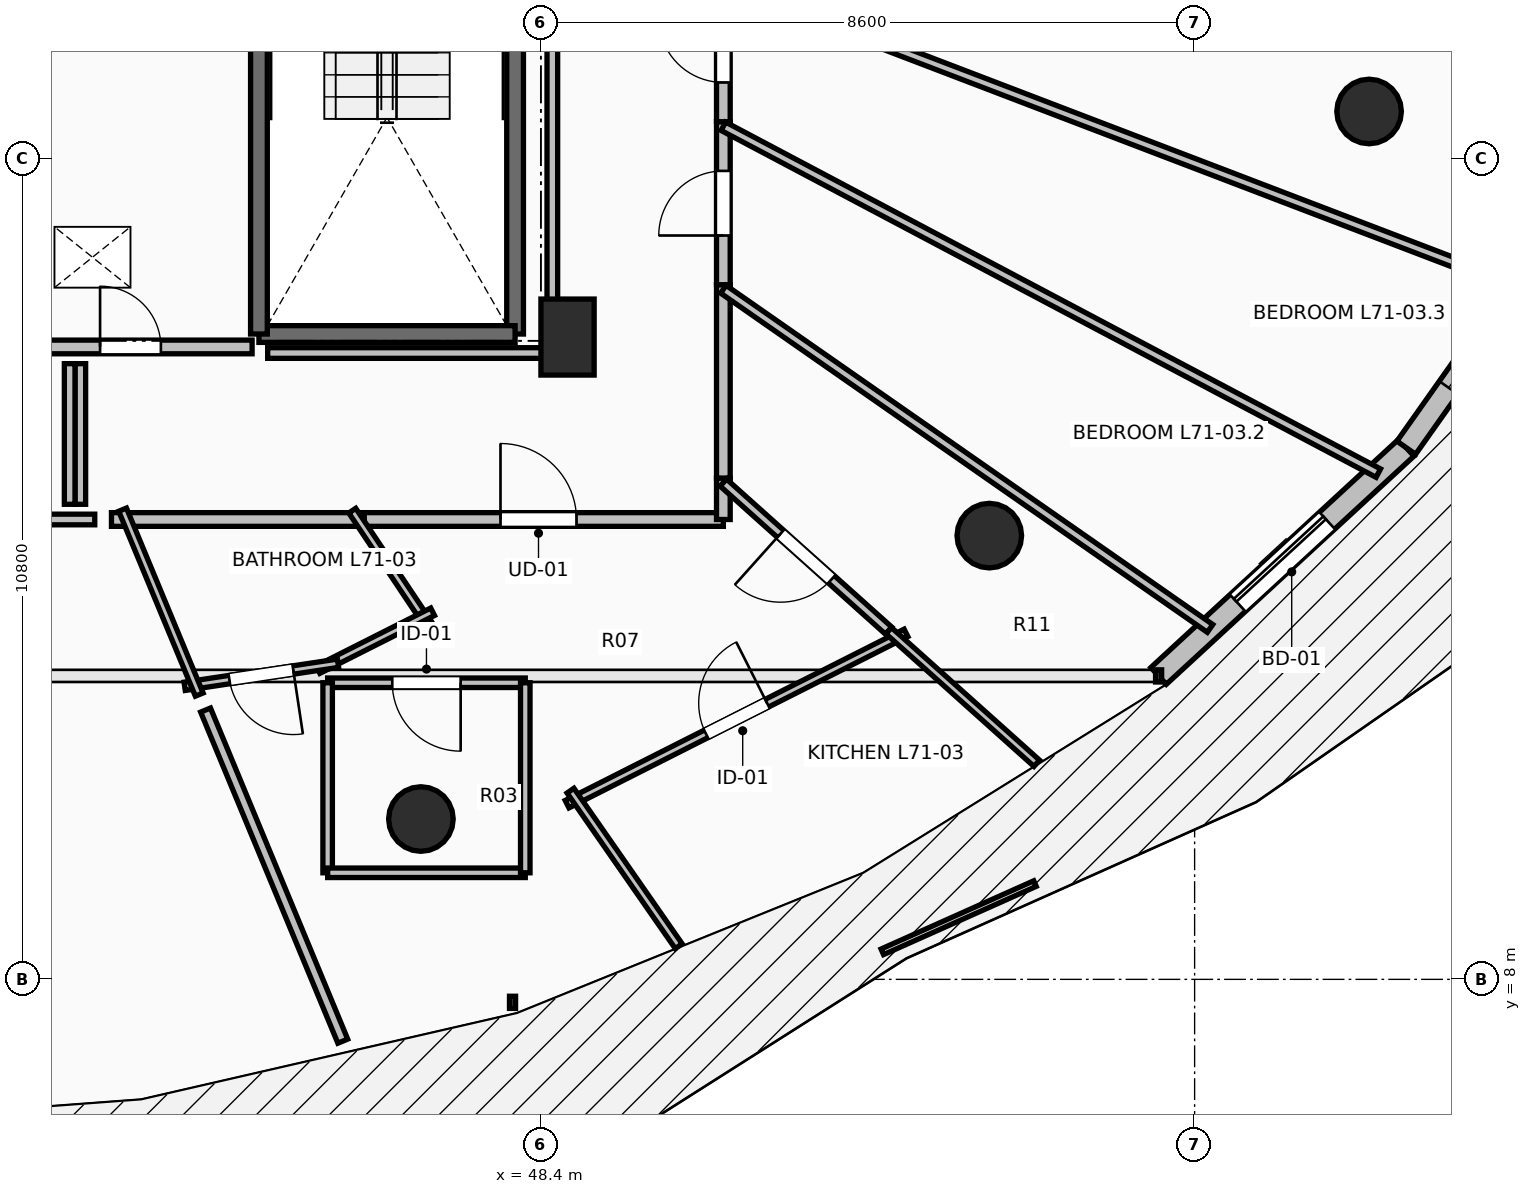
"""IFC4 building model, lengths in metres.
Left out: names, types, materials, properties, quantities, classifications, styles, units other than length and angle.
Written with IfcOpenShell. Run it as: python <this file> out.ifc"""

import sys

from ifc_helpers import new_model, si_unit, direction, frame, frame_2d, origin, origin_2d, place, context, subcontext, project, spatial, rectangle, circle, extrude, element, fill, save


model = new_model("IFC4")
c1 = context("Model", 3, precision=1e-05, world=origin(), true_north=direction((0.0, 1.0)))
c2 = subcontext(c1, "Body", "Model", "MODEL_VIEW")
j1 = project(units=[si_unit("LENGTHUNIT", "METRE"), si_unit("PLANEANGLEUNIT", "RADIAN")], contexts=[c1])
p1 = place(None, origin())
s1 = spatial("IfcSite", under=j1, at=p1, CompositionType="ELEMENT")
p2 = place(p1, origin())
s2 = spatial("IfcBuilding", under=s1, at=p2, CompositionType="ELEMENT")
p3 = place(p2, frame((0.0, 0.0, 262.65)))
s3 = spatial("IfcBuildingStorey", under=s2, at=p3, CompositionType="ELEMENT", Elevation=262.65)
for number, where, z_axis, x_axis in (
    (1, (46.821, 10.109, 0.0), (0.0, 0.0, 1.0), (0.383, -0.924, 0.0)),
    (2, (54.299, 13.838, 0.0), (0.0, 0.0, 1.0), (0.707, -0.707, 0.0)),
    (3, (59.295, 19.418, 0.0), (0.0, 0.0, 1.0), (0.924, -0.383, 0.0)),
):
    element("IfcColumn", number, at=place(p3, frame(where, z_axis=z_axis, x_axis=x_axis)), inside=s3, PredefinedType="COLUMN", context=c2, shape_type="SweptSolid", body=[
        extrude(circle(Radius=0.425, at=origin_2d()), origin(), (0.0, 0.0, 1.0), 3.55),
    ])
p4 = place(p3, frame((48.75, 16.45, 0.0), z_axis=(0.0, 0.0, 1.0), x_axis=(1.0, 0.0, 0.0)))
e4 = element("IfcColumn", 4, at=p4, inside=s3, PredefinedType="PILASTER", context=c2, shape_type="SweptSolid", body=[
    extrude(rectangle(XDim=0.7, YDim=1.0, at=origin_2d()), origin(), (0.0, 0.0, 1.0), 3.55),
])
p5 = place(p3, frame((56.526, 11.992, 0.0), z_axis=(0.0, 0.0, 1.0), x_axis=(0.735445373611, 0.677584018727, 0.0)))
e5 = element("IfcWall", 5, at=p5, inside=s3, PredefinedType="STANDARD", context=c2, shape_type="SweptSolid", body=[
    extrude(rectangle(XDim=4.43, YDim=0.3, at=frame_2d((2.215, 0.0))), origin(), (0.0, 0.0, 1.0), 3.29),
])
p6 = place(p5, frame((1.415, 0.0, 0.0)))
e6 = element("IfcOpeningElement", 6, at=p6, cuts=e5, PredefinedType="OPENING", context=c2, shape_type="SweptSolid", body=[
    extrude(rectangle(XDim=1.6, YDim=2.3, at=frame_2d((0.8, 1.15))), frame((0.0, 0.165, 0.0), z_axis=(0.0, -1.0, 0.0), x_axis=(1.0, 0.0, 0.0)), (0.0, 0.0, 1.0), 0.33),
])
p7 = place(p3, frame((59.784, 14.994, 0.0), z_axis=(0.0, 0.0, 1.0), x_axis=(0.577261247247, 0.816559521668, 0.0)))
e7 = element("IfcWall", 7, at=p7, inside=s3, PredefinedType="STANDARD", context=c2, shape_type="SweptSolid", body=[
    extrude(rectangle(XDim=4.194, YDim=0.3, at=frame_2d((2.097, 0.0))), origin(), (0.0, 0.0, 1.0), 3.29),
])
p8 = place(p7, frame((0.966, 0.0, 0.85)))
e8 = element("IfcOpeningElement", 8, at=p8, cuts=e7, PredefinedType="OPENING", context=c2, shape_type="SweptSolid", body=[
    extrude(rectangle(XDim=1.2, YDim=1.95, at=frame_2d((0.6, 0.975))), frame((0.0, 0.165, 0.0), z_axis=(0.0, -1.0, 0.0), x_axis=(1.0, 0.0, 0.0)), (0.0, 0.0, 1.0), 0.33),
])
p9 = place(p7, frame((2.977, 0.0, 0.85)))
e9 = element("IfcOpeningElement", 9, at=p9, cuts=e7, PredefinedType="OPENING", context=c2, shape_type="SweptSolid", body=[
    extrude(rectangle(XDim=0.9, YDim=1.8, at=frame_2d((0.45, 0.9))), frame((0.0, 0.165, 0.0), z_axis=(0.0, -1.0, 0.0), x_axis=(1.0, 0.0, 0.0)), (0.0, 0.0, 1.0), 0.33),
])
p10 = place(p3, frame((48.06, 23.91, 0.0), z_axis=(0.0, 0.0, 1.0), x_axis=(0.0, -1.0, 0.0)))
e10 = element("IfcWall", 10, at=p10, inside=s3, PredefinedType="SOLIDWALL", context=c2, shape_type="SweptSolid", body=[
    extrude(rectangle(XDim=7.42, YDim=0.22, at=frame_2d((3.71, 0.0))), origin(), (0.0, 0.0, 1.0), 3.29),
])
p11 = place(p3, frame((48.06, 16.49, 0.0), z_axis=(0.0, 0.0, 1.0), x_axis=(-1.0, 0.0, 0.0)))
e11 = element("IfcWall", 11, at=p11, inside=s3, PredefinedType="SOLIDWALL", context=c2, shape_type="SweptSolid", body=[
    extrude(rectangle(XDim=3.37, YDim=0.22, at=frame_2d((1.685, 0.0))), origin(), (0.0, 0.0, 1.0), 3.29),
])
p12 = place(p3, frame((44.69, 16.49, 0.0), z_axis=(0.0, 0.0, 1.0), x_axis=(0.0, 1.0, 0.0)))
e12 = element("IfcWall", 12, at=p12, inside=s3, PredefinedType="SOLIDWALL", context=c2, shape_type="SweptSolid", body=[
    extrude(rectangle(XDim=7.42, YDim=0.22, at=frame_2d((3.71, 0.0))), origin(), (0.0, 0.0, 1.0), 3.29),
])
p13 = place(p3, frame((41.4, 16.32, 0.0), z_axis=(0.0, 0.0, 1.0), x_axis=(1.0, 0.0, 0.0)))
e13 = element("IfcWall", 13, at=p13, inside=s3, PredefinedType="PARTITIONING", context=c2, shape_type="SweptSolid", body=[
    extrude(rectangle(XDim=3.2, YDim=0.18, at=frame_2d((1.6, 0.0))), origin(), (0.0, 0.0, 1.0), 3.29),
])
p14 = place(p13, frame((1.2, 0.0, 0.0)))
e14 = element("IfcOpeningElement", 14, at=p14, cuts=e13, PredefinedType="OPENING", context=c2, shape_type="SweptSolid", body=[
    extrude(rectangle(XDim=0.8, YDim=2.05, at=frame_2d((0.4, 1.025))), frame((0.0, 0.105, 0.0), z_axis=(0.0, -1.0, 0.0), x_axis=(1.0, 0.0, 0.0)), (0.0, 0.0, 1.0), 0.21),
])
p15 = place(p3, frame((45.936, 14.05, 0.0), z_axis=(0.0, 0.0, 1.0), x_axis=(1.0, 0.0, 0.0)))
e15 = element("IfcWall", 15, at=p15, inside=s3, PredefinedType="PARTITIONING", context=c2, shape_type="SweptSolid", body=[
    extrude(rectangle(XDim=4.864, YDim=0.18, at=frame_2d((2.432, 0.0))), origin(), (0.0, 0.0, 1.0), 2.482),
])
p16 = place(p15, frame((1.932, 0.0, 0.0)))
e16 = element("IfcOpeningElement", 16, at=p16, cuts=e15, PredefinedType="OPENING", context=c2, shape_type="SweptSolid", body=[
    extrude(rectangle(XDim=1.0, YDim=2.15, at=frame_2d((0.5, 1.075))), frame((0.0, 0.105, 0.0), z_axis=(0.0, -1.0, 0.0), x_axis=(1.0, 0.0, 0.0)), (0.0, 0.0, 1.0), 0.21),
])
p17 = place(p3, frame((50.8, 14.05, 0.0), z_axis=(0.0, 0.0, 1.0), x_axis=(0.0, 1.0, 0.0)))
e17 = element("IfcWall", 17, at=p17, inside=s3, PredefinedType="PARTITIONING", context=c2, shape_type="SweptSolid", body=[
    extrude(rectangle(XDim=0.545, YDim=0.18, at=frame_2d((0.272, 0.0))), origin(), (0.0, 0.0, 1.0), 3.022),
])
p18 = place(p3, frame((42.75, 14.05, 0.0), z_axis=(0.0, 0.0, 1.0), x_axis=(1.0, 0.0, 0.0)))
e18 = element("IfcWall", 18, at=p18, inside=s3, PredefinedType="PARTITIONING", context=c2, shape_type="SweptSolid", body=[
    extrude(rectangle(XDim=3.326, YDim=0.18, at=frame_2d((1.663, 0.0))), origin(), (0.0, 0.0, 1.0), 2.482),
])
p19 = place(p3, frame((50.8, 14.595, 0.0), z_axis=(0.0, 0.0, 1.0), x_axis=(0.0, 1.0, 0.0)))
e19 = element("IfcWall", 19, at=p19, inside=s3, PredefinedType="PARTITIONING", context=c2, shape_type="SweptSolid", body=[
    extrude(rectangle(XDim=2.544, YDim=0.18, at=frame_2d((1.272, 0.0))), origin(), (0.0, 0.0, 1.0), 2.482),
])
p20 = place(p3, frame((50.8, 17.139, 0.0), z_axis=(0.0, 0.0, 1.0), x_axis=(0.0, 1.0, 0.0)))
e20 = element("IfcWall", 20, at=p20, inside=s3, PredefinedType="PARTITIONING", context=c2, shape_type="SweptSolid", body=[
    extrude(rectangle(XDim=2.144, YDim=0.18, at=frame_2d((1.072, 0.0))), origin(), (0.0, 0.0, 1.0), 3.29),
])
p21 = place(p20, frame((0.647, 0.0, 0.0)))
e21 = element("IfcOpeningElement", 21, at=p21, cuts=e20, PredefinedType="OPENING", context=c2, shape_type="SweptSolid", body=[
    extrude(rectangle(XDim=0.85, YDim=2.1, at=frame_2d((0.425, 1.05))), frame((0.0, 0.105, 0.0), z_axis=(0.0, -1.0, 0.0), x_axis=(1.0, 0.0, 0.0)), (0.0, 0.0, 1.0), 0.21),
])
p22 = place(p3, frame((50.8, 19.283, 0.0), z_axis=(0.0, 0.0, 1.0), x_axis=(0.0, 1.0, 0.0)))
e22 = element("IfcWall", 22, at=p22, inside=s3, PredefinedType="PARTITIONING", context=c2, shape_type="SweptSolid", body=[
    extrude(rectangle(XDim=1.883, YDim=0.18, at=frame_2d((0.941, 0.0))), origin(), (0.0, 0.0, 1.0), 3.29),
])
p23 = place(p22, frame((0.517, 0.0, 0.0)))
e23 = element("IfcOpeningElement", 23, at=p23, cuts=e22, PredefinedType="OPENING", context=c2, shape_type="SweptSolid", body=[
    extrude(rectangle(XDim=0.85, YDim=2.1, at=frame_2d((0.425, 1.05))), frame((0.0, 0.105, 0.0), z_axis=(0.0, -1.0, 0.0), x_axis=(1.0, 0.0, 0.0)), (0.0, 0.0, 1.0), 0.21),
])
p24 = place(p3, frame((45.918, 14.167, 0.0), z_axis=(0.0, 0.0, 1.0), x_axis=(0.555785343288, -0.831325839961, 0.0)))
e24 = element("IfcWall", 24, at=p24, inside=s3, PredefinedType="PARTITIONING", context=c2, shape_type="SweptSolid", body=[
    extrude(rectangle(XDim=1.816, YDim=0.11, at=frame_2d((0.908, 0.0))), origin(), (0.0, 0.0, 1.0), 2.482),
])
p25 = place(p3, frame((46.975, 12.836, 0.0), z_axis=(0.0, 0.0, 1.0), x_axis=(-0.892715322691, -0.450621074332, 0.0)))
e25 = element("IfcWall", 25, at=p25, inside=s3, PredefinedType="PARTITIONING", context=c2, shape_type="SweptSolid", body=[
    extrude(rectangle(XDim=1.689, YDim=0.11, at=frame_2d((0.845, 0.0))), origin(), (0.0, 0.0, 1.0), 3.29),
])
p26 = place(p3, frame((45.73, 12.159, 0.0), z_axis=(0.0, 0.0, 1.0), x_axis=(-0.98887923552, -0.148720736812, 0.0)))
e26 = element("IfcWall", 26, at=p26, inside=s3, PredefinedType="PARTITIONING", context=c2, shape_type="SweptSolid", body=[
    extrude(rectangle(XDim=2.041, YDim=0.11, at=frame_2d((1.02, 0.0))), origin(), (0.0, 0.0, 1.0), 3.29),
])
p27 = place(p26, frame((0.595, 0.0, 0.0)))
e27 = element("IfcOpeningElement", 27, at=p27, cuts=e26, PredefinedType="OPENING", context=c2, shape_type="SweptSolid", body=[
    extrude(rectangle(XDim=0.85, YDim=2.1, at=frame_2d((0.425, 1.05))), frame((0.0, 0.07, 0.0), z_axis=(0.0, -1.0, 0.0), x_axis=(1.0, 0.0, 0.0)), (0.0, 0.0, 1.0), 0.14),
])
p28 = place(p3, frame((43.905, 11.747, 0.0), z_axis=(0.0, 0.0, 1.0), x_axis=(-0.38282398209, 0.923821302383, 0.0)))
e28 = element("IfcWall", 28, at=p28, inside=s3, PredefinedType="PARTITIONING", context=c2, shape_type="SweptSolid", body=[
    extrude(rectangle(XDim=2.633, YDim=0.11, at=frame_2d((1.317, 0.0))), origin(), (0.0, 0.0, 1.0), 2.482),
])
p29 = place(p3, frame((48.744, 10.305, 0.0), z_axis=(0.0, 0.0, 1.0), x_axis=(0.892523078089, 0.45100172403, 0.0)))
e29 = element("IfcWall", 29, at=p29, inside=s3, PredefinedType="PARTITIONING", context=c2, shape_type="SweptSolid", body=[
    extrude(rectangle(XDim=4.996, YDim=0.11, at=frame_2d((2.498, 0.0))), origin(), (0.0, 0.0, 1.0), 3.29),
])
p30 = place(p29, frame((2.048, 0.0, 0.0)))
e30 = element("IfcOpeningElement", 30, at=p30, cuts=e29, PredefinedType="OPENING", context=c2, shape_type="SweptSolid", body=[
    extrude(rectangle(XDim=0.9, YDim=2.1, at=frame_2d((0.45, 1.05))), frame((0.0, 0.07, 0.0), z_axis=(0.0, -1.0, 0.0), x_axis=(1.0, 0.0, 0.0)), (0.0, 0.0, 1.0), 0.14),
])
p31 = place(p3, frame((52.974, 12.588, 0.0), z_axis=(0.0, 0.0, 1.0), x_axis=(0.744980199756, -0.667086577568, 0.0)))
e31 = element("IfcWall", 31, at=p31, inside=s3, PredefinedType="PARTITIONING", context=c2, shape_type="SweptSolid", body=[
    extrude(rectangle(XDim=2.617, YDim=0.11, at=frame_2d((1.309, 0.0))), origin(), (0.0, 0.0, 1.0), 3.29),
])
p32 = place(p3, frame((50.213, 8.436, 0.0), z_axis=(0.0, 0.0, 1.0), x_axis=(-0.571041537148, 0.820921167258, 0.0)))
e32 = element("IfcWall", 32, at=p32, inside=s3, PredefinedType="PARTITIONING", context=c2, shape_type="SweptSolid", body=[
    extrude(rectangle(XDim=2.493, YDim=0.11, at=frame_2d((1.247, 0.0))), origin(), (0.0, 0.0, 1.0), 3.29),
])
p33 = place(p3, frame((48.194, 11.902, 0.0), z_axis=(0.0, 0.0, 1.0), x_axis=(-1.0, 0.0, 0.0)))
e33 = element("IfcWall", 33, at=p33, inside=s3, PredefinedType="PARTITIONING", context=c2, shape_type="SweptSolid", body=[
    extrude(rectangle(XDim=2.6, YDim=0.125, at=frame_2d((1.3, 0.0))), origin(), (0.0, 0.0, 1.0), 2.482),
])
p34 = place(p33, frame((0.85, 0.0, 0.0)))
e34 = element("IfcOpeningElement", 34, at=p34, cuts=e33, PredefinedType="OPENING", context=c2, shape_type="SweptSolid", body=[
    extrude(rectangle(XDim=0.9, YDim=2.1, at=frame_2d((0.45, 1.05))), frame((0.0, 0.077, 0.0), z_axis=(0.0, -1.0, 0.0), x_axis=(1.0, 0.0, 0.0)), (0.0, 0.0, 1.0), 0.155),
])
p35 = place(p3, frame((45.594, 11.902, 0.0), z_axis=(0.0, 0.0, 1.0), x_axis=(0.0, -1.0, 0.0)))
e35 = element("IfcWall", 35, at=p35, inside=s3, PredefinedType="PARTITIONING", context=c2, shape_type="SweptSolid", body=[
    extrude(rectangle(XDim=2.5, YDim=0.125, at=frame_2d((1.25, 0.0))), origin(), (0.0, 0.0, 1.0), 2.874),
])
p36 = place(p3, frame((45.594, 9.402, 0.0), z_axis=(0.0, 0.0, 1.0), x_axis=(1.0, 0.0, 0.0)))
e36 = element("IfcWall", 36, at=p36, inside=s3, PredefinedType="PARTITIONING", context=c2, shape_type="SweptSolid", body=[
    extrude(rectangle(XDim=2.6, YDim=0.125, at=frame_2d((1.3, 0.0))), origin(), (0.0, 0.0, 1.0), 3.29),
])
p37 = place(p3, frame((48.194, 9.402, 0.0), z_axis=(0.0, 0.0, 1.0), x_axis=(0.0, 1.0, 0.0)))
e37 = element("IfcWall", 37, at=p37, inside=s3, PredefinedType="PARTITIONING", context=c2, shape_type="SweptSolid", body=[
    extrude(rectangle(XDim=2.5, YDim=0.125, at=frame_2d((1.25, 0.0))), origin(), (0.0, 0.0, 1.0), 2.874),
])
p38 = place(p3, frame((52.974, 12.588, 0.0), z_axis=(0.0, 0.0, 1.0), x_axis=(-0.744943619707, 0.667127426702, 0.0)))
e38 = element("IfcWall", 38, at=p38, inside=s3, PredefinedType="PARTITIONING", context=c2, shape_type="SweptSolid", body=[
    extrude(rectangle(XDim=2.918, YDim=0.125, at=frame_2d((1.459, 0.0))), origin(), (0.0, 0.0, 1.0), 2.874),
])
p39 = place(p38, frame((1.009, 0.0, 0.0)))
e39 = element("IfcOpeningElement", 39, at=p39, cuts=e38, PredefinedType="OPENING", context=c2, shape_type="SweptSolid", body=[
    extrude(rectangle(XDim=0.9, YDim=2.1, at=frame_2d((0.45, 1.05))), frame((0.0, 0.077, 0.0), z_axis=(0.0, -1.0, 0.0), x_axis=(1.0, 0.0, 0.0)), (0.0, 0.0, 1.0), 0.155),
])
p40 = place(p3, frame((57.203, 12.617, 0.0), z_axis=(0.0, 0.0, 1.0), x_axis=(-0.820423513177, 0.571756293386, 0.0)))
e40 = element("IfcWall", 40, at=p40, inside=s3, PredefinedType="PARTITIONING", context=c2, shape_type="SweptSolid", body=[
    extrude(rectangle(XDim=7.804, YDim=0.125, at=frame_2d((3.902, 0.0))), origin(), (0.0, 0.0, 1.0), 2.874),
])
p41 = place(p3, frame((59.417, 14.66, 0.0), z_axis=(0.0, 0.0, 1.0), x_axis=(-0.883742233358, 0.467974000325, 0.0)))
e41 = element("IfcWall", 41, at=p41, inside=s3, PredefinedType="PARTITIONING", context=c2, shape_type="SweptSolid", body=[
    extrude(rectangle(XDim=9.75, YDim=0.125, at=frame_2d((4.875, 0.0))), origin(), (0.0, 0.0, 1.0), 2.874),
])
p42 = place(p3, frame((61.271, 17.102, 0.0), z_axis=(0.0, 0.0, 1.0), x_axis=(-0.934042646632, 0.357161496066, 0.0)))
e42 = element("IfcWall", 42, at=p42, inside=s3, PredefinedType="PARTITIONING", context=c2, shape_type="SweptSolid", body=[
    extrude(rectangle(XDim=11.21, YDim=0.125, at=frame_2d((5.605, 0.0))), origin(), (0.0, 0.0, 1.0), 2.874),
])
p43 = place(p3, frame((62.776, 19.846, 0.0), z_axis=(0.0, 0.0, 1.0), x_axis=(-0.970519565335, 0.241022350211, 0.0)))
e43 = element("IfcWall", 43, at=p43, inside=s3, PredefinedType="PARTITIONING", context=c2, shape_type="SweptSolid", body=[
    extrude(rectangle(XDim=12.34, YDim=0.125, at=frame_2d((6.17, 0.0))), origin(), (0.0, 0.0, 1.0), 2.482),
])
p44 = place(p3, frame((39.45, 14.05, 0.0), z_axis=(0.0, 0.0, 1.0), x_axis=(1.0, 0.0, 0.0)))
e44 = element("IfcWall", 44, at=p44, inside=s3, PredefinedType="PARTITIONING", context=c2, shape_type="SweptSolid", body=[
    extrude(rectangle(XDim=3.08, YDim=0.14, at=frame_2d((1.54, 0.0))), origin(), (0.0, 0.0, 1.0), 2.936),
])
p45 = place(p3, frame((42.34, 14.25, 0.0), z_axis=(0.0, 0.0, 1.0), x_axis=(0.0, 1.0, 0.0)))
e45 = element("IfcWall", 45, at=p45, inside=s3, PredefinedType="PARTITIONING", context=c2, shape_type="SweptSolid", body=[
    extrude(rectangle(XDim=1.85, YDim=0.14, at=frame_2d((0.925, 0.0))), origin(), (0.0, 0.0, 1.0), 3.29),
])
p46 = place(p3, frame((44.805, 16.24, 0.0), z_axis=(0.0, 0.0, 1.0), x_axis=(1.0, 0.0, 0.0)))
e46 = element("IfcWall", 46, at=p46, inside=s3, PredefinedType="PARTITIONING", context=c2, shape_type="SweptSolid", body=[
    extrude(rectangle(XDim=3.745, YDim=0.14, at=frame_2d((1.873, 0.0))), origin(), (0.0, 0.0, 1.0), 2.482),
])
p47 = place(p3, frame((48.55, 16.24, 0.0), z_axis=(0.0, 0.0, 1.0), x_axis=(0.0, 1.0, 0.0)))
e47 = element("IfcWall", 47, at=p47, inside=s3, PredefinedType="PARTITIONING", context=c2, shape_type="SweptSolid", body=[
    extrude(rectangle(XDim=7.514, YDim=0.14, at=frame_2d((3.757, 0.0))), origin(), (0.0, 0.0, 1.0), 2.482),
])
p48 = place(p3, frame((42.2, 16.1, 0.0), z_axis=(0.0, 0.0, 1.0), x_axis=(0.0, -1.0, 0.0)))
e48 = element("IfcWall", 48, at=p48, inside=s3, PredefinedType="PARTITIONING", context=c2, shape_type="SweptSolid", body=[
    extrude(rectangle(XDim=1.85, YDim=0.14, at=frame_2d((0.925, 0.0))), origin(), (0.0, 0.0, 1.0), 3.29),
])
p49 = place(p3, frame((43.988, 11.543, 0.0), z_axis=(0.0, 0.0, 1.0), x_axis=(0.382798409849, -0.923831898895, 0.0)))
e49 = element("IfcWall", 49, at=p49, inside=s3, PredefinedType="PARTITIONING", context=c2, shape_type="SweptSolid", body=[
    extrude(rectangle(XDim=4.715, YDim=0.14, at=frame_2d((2.357, 0.0))), origin(), (0.0, 0.0, 1.0), 2.874),
])
p50 = place(p6, origin())
e50 = element("IfcDoor", 50, at=p50, inside=s3, OperationType="SLIDING_TO_LEFT", PredefinedType="DOOR", context=c2, shape_type="SweptSolid", body=[
    extrude(rectangle(XDim=1.6, YDim=2.3, at=frame_2d((0.8, 1.15))), frame((0.0, 0.025, 0.0), z_axis=(0.0, -1.0, 0.0), x_axis=(1.0, 0.0, 0.0)), (0.0, 0.0, 1.0), 0.05),
])
fill(e6, e50)
p51 = place(p8, origin())
e51 = element("IfcWindow", 51, at=p51, inside=s3, PartitioningType="SINGLE_PANEL", PredefinedType="WINDOW", context=c2, shape_type="SweptSolid", body=[
    extrude(rectangle(XDim=1.2, YDim=1.95, at=frame_2d((0.6, 0.975))), frame((0.0, 0.03, 0.0), z_axis=(0.0, -1.0, 0.0), x_axis=(1.0, 0.0, 0.0)), (0.0, 0.0, 1.0), 0.06),
])
fill(e8, e51)
p52 = place(p14, origin())
e52 = element("IfcDoor", 52, at=p52, inside=s3, OperationType="SINGLE_SWING_LEFT", PredefinedType="DOOR", context=c2, shape_type="SweptSolid", body=[
    extrude(rectangle(XDim=0.8, YDim=2.05, at=frame_2d((0.4, 1.025))), frame((0.0, 0.025, 0.0), z_axis=(0.0, -1.0, 0.0), x_axis=(1.0, 0.0, 0.0)), (0.0, 0.0, 1.0), 0.05),
])
fill(e14, e52)
p53 = place(p16, origin())
e53 = element("IfcDoor", 53, at=p53, inside=s3, OperationType="SINGLE_SWING_LEFT", PredefinedType="DOOR", context=c2, shape_type="SweptSolid", body=[
    extrude(rectangle(XDim=1.0, YDim=2.15, at=frame_2d((0.5, 1.075))), frame((0.0, 0.025, 0.0), z_axis=(0.0, -1.0, 0.0), x_axis=(1.0, 0.0, 0.0)), (0.0, 0.0, 1.0), 0.05),
])
fill(e16, e53)
p54 = place(p27, origin())
e54 = element("IfcDoor", 54, at=p54, inside=s3, OperationType="SINGLE_SWING_LEFT", PredefinedType="DOOR", context=c2, shape_type="SweptSolid", body=[
    extrude(rectangle(XDim=0.85, YDim=2.1, at=frame_2d((0.425, 1.05))), frame((0.0, 0.025, 0.0), z_axis=(0.0, -1.0, 0.0), x_axis=(1.0, 0.0, 0.0)), (0.0, 0.0, 1.0), 0.05),
])
fill(e27, e54)
p55 = place(p30, origin())
e55 = element("IfcDoor", 55, at=p55, inside=s3, OperationType="SINGLE_SWING_RIGHT", PredefinedType="DOOR", context=c2, shape_type="SweptSolid", body=[
    extrude(rectangle(XDim=0.9, YDim=2.1, at=frame_2d((0.45, 1.05))), frame((0.0, 0.025, 0.0), z_axis=(0.0, -1.0, 0.0), x_axis=(1.0, 0.0, 0.0)), (0.0, 0.0, 1.0), 0.05),
])
fill(e30, e55)
p56 = place(p34, origin())
e56 = element("IfcDoor", 56, at=p56, inside=s3, OperationType="SINGLE_SWING_LEFT", PredefinedType="DOOR", context=c2, shape_type="SweptSolid", body=[
    extrude(rectangle(XDim=0.9, YDim=2.1, at=frame_2d((0.45, 1.05))), frame((0.0, 0.025, 0.0), z_axis=(0.0, -1.0, 0.0), x_axis=(1.0, 0.0, 0.0)), (0.0, 0.0, 1.0), 0.05),
])
fill(e34, e56)
p57 = place(p39, origin())
e57 = element("IfcDoor", 57, at=p57, inside=s3, OperationType="SINGLE_SWING_RIGHT", PredefinedType="DOOR", context=c2, shape_type="SweptSolid", body=[
    extrude(rectangle(XDim=0.9, YDim=2.1, at=frame_2d((0.45, 1.05))), frame((0.0, 0.025, 0.0), z_axis=(0.0, -1.0, 0.0), x_axis=(1.0, 0.0, 0.0)), (0.0, 0.0, 1.0), 0.05),
])
fill(e39, e57)
p58 = place(p21, origin())
e58 = element("IfcDoor", 58, at=p58, inside=s3, OperationType="SINGLE_SWING_LEFT", PredefinedType="DOOR", context=c2, shape_type="SweptSolid", body=[
    extrude(rectangle(XDim=0.85, YDim=2.1, at=frame_2d((0.425, 1.05))), frame((0.0, 0.025, 0.0), z_axis=(0.0, -1.0, 0.0), x_axis=(1.0, 0.0, 0.0)), (0.0, 0.0, 1.0), 0.05),
])
fill(e21, e58)
p59 = place(p23, origin())
e59 = element("IfcDoor", 59, at=p59, inside=s3, OperationType="SINGLE_SWING_RIGHT", PredefinedType="DOOR", context=c2, shape_type="SweptSolid", body=[
    extrude(rectangle(XDim=0.85, YDim=2.1, at=frame_2d((0.425, 1.05))), frame((0.0, 0.025, 0.0), z_axis=(0.0, -1.0, 0.0), x_axis=(1.0, 0.0, 0.0)), (0.0, 0.0, 1.0), 0.05),
])
fill(e23, e59)
save(model, sys.argv[1])
